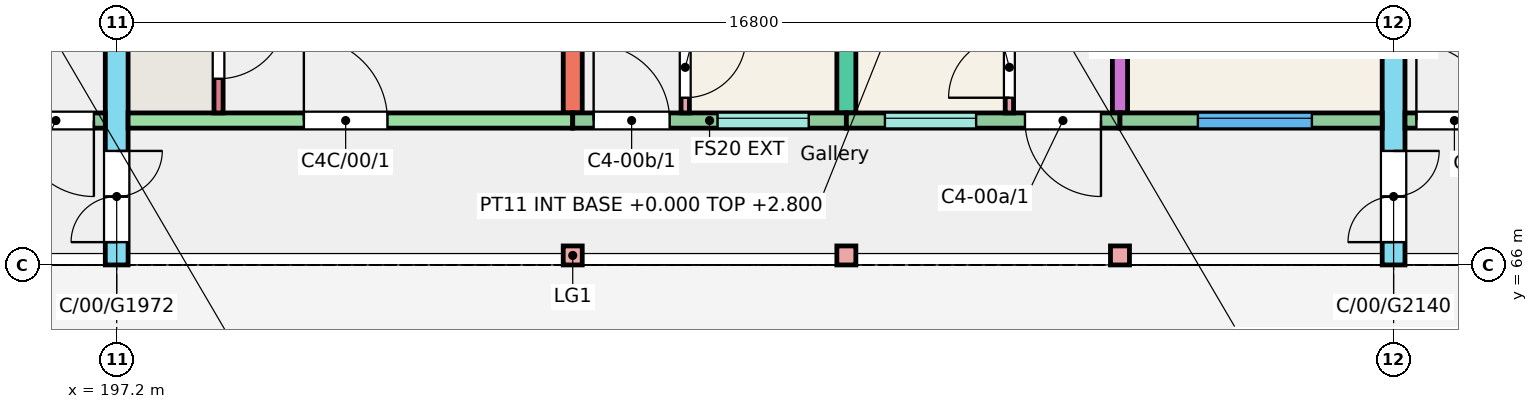
"""IFC4 building model, lengths in metres.
Left out: names, types, materials, properties, quantities, classifications, styles, units other than length and angle.
Written with IfcOpenShell. Run it as: python <this file> out.ifc"""

import sys

from ifc_helpers import new_model, si_unit, direction, frame, frame_2d, origin, origin_2d, place, context, subcontext, project, spatial, rectangle, extrude, element, fill, save


model = new_model("IFC4")
c1 = context("Model", 3, precision=1e-05, world=origin(), true_north=direction((0.0, 1.0)))
c2 = subcontext(c1, "Body", "Model", "MODEL_VIEW")
j1 = project(units=[si_unit("LENGTHUNIT", "METRE"), si_unit("PLANEANGLEUNIT", "RADIAN")], contexts=[c1])
p1 = place(None, origin())
s1 = spatial("IfcSite", under=j1, at=p1, CompositionType="ELEMENT")
p2 = place(p1, origin())
s2 = spatial("IfcBuilding", under=s1, at=p2, CompositionType="ELEMENT")
p3 = place(p2, origin())
s3 = spatial("IfcBuildingStorey", under=s2, at=p3, CompositionType="ELEMENT", Elevation=0.0)
p4 = place(p3, frame((197.2, 66.0, -0.25), z_axis=(0.0, 0.0, 1.0), x_axis=(0.0, 1.0, 0.0)))
e1 = element("IfcWall", 1, at=p4, inside=s3, PredefinedType="SHEAR", context=c2, shape_type="SweptSolid", body=[
    extrude(rectangle(XDim=11.0, YDim=0.3, at=frame_2d((5.5, 0.0))), origin(), (0.0, 0.0, 1.0), 3.25),
])
p5 = place(p4, frame((0.3, 0.0, 0.25)))
e2 = element("IfcOpeningElement", 2, at=p5, cuts=e1, PredefinedType="OPENING", context=c2, shape_type="SweptSolid", body=[
    extrude(rectangle(XDim=1.2, YDim=2.1, at=frame_2d((0.6, 1.05))), frame((0.0, 0.16, 0.0), z_axis=(0.0, -1.0, 0.0), x_axis=(1.0, 0.0, 0.0)), (0.0, 0.0, 1.0), 0.32),
])
for number, where, z_axis, x_axis in (
    (3, (203.2, 68.0, -0.25), (0.0, 0.0, 1.0), (0.0, 1.0, 0.0)),
    (4, (206.8, 68.0, -0.25), (0.0, 0.0, 1.0), (0.0, 1.0, 0.0)),
):
    element("IfcWall", number, at=place(p3, frame(where, z_axis=z_axis, x_axis=x_axis)), inside=s3, PredefinedType="SHEAR", context=c2, shape_type="SweptSolid", body=[
        extrude(rectangle(XDim=9.0, YDim=0.25, at=frame_2d((4.5, 0.0))), origin(), (0.0, 0.0, 1.0), 3.25),
    ])
p6 = place(p3, frame((210.4, 68.0, -0.25), z_axis=(0.0, 0.0, 1.0), x_axis=(0.0, 1.0, 0.0)))
e5 = element("IfcWall", 5, at=p6, inside=s3, PredefinedType="SHEAR", context=c2, shape_type="SweptSolid", body=[
    extrude(rectangle(XDim=9.0, YDim=0.2, at=frame_2d((4.5, 0.0))), origin(), (0.0, 0.0, 1.0), 3.25),
])
p7 = place(p6, frame((2.4, 0.0, 0.25)))
e6 = element("IfcOpeningElement", 6, at=p7, cuts=e5, PredefinedType="OPENING", context=c2, shape_type="SweptSolid", body=[
    extrude(rectangle(XDim=1.2, YDim=2.1, at=frame_2d((0.6, 1.05))), frame((0.0, 0.11, 0.0), z_axis=(0.0, -1.0, 0.0), x_axis=(1.0, 0.0, 0.0)), (0.0, 0.0, 1.0), 0.22),
])
p8 = place(p6, frame((6.4, 0.0, 0.25)))
e7 = element("IfcOpeningElement", 7, at=p8, cuts=e5, PredefinedType="OPENING", context=c2, shape_type="SweptSolid", body=[
    extrude(rectangle(XDim=1.2, YDim=2.1, at=frame_2d((0.6, 1.05))), frame((0.0, 0.11, 0.0), z_axis=(0.0, -1.0, 0.0), x_axis=(1.0, 0.0, 0.0)), (0.0, 0.0, 1.0), 0.22),
])
p9 = place(p3, frame((214.0, 66.0, -0.25), z_axis=(0.0, 0.0, 1.0), x_axis=(0.0, 1.0, 0.0)))
e8 = element("IfcWall", 8, at=p9, inside=s3, PredefinedType="SHEAR", context=c2, shape_type="SweptSolid", body=[
    extrude(rectangle(XDim=11.0, YDim=0.3, at=frame_2d((5.5, 0.0))), origin(), (0.0, 0.0, 1.0), 3.25),
])
p10 = place(p9, frame((0.3, 0.0, 0.25)))
e9 = element("IfcOpeningElement", 9, at=p10, cuts=e8, PredefinedType="OPENING", context=c2, shape_type="SweptSolid", body=[
    extrude(rectangle(XDim=1.2, YDim=2.1, at=frame_2d((0.6, 1.05))), frame((0.0, 0.16, 0.0), z_axis=(0.0, -1.0, 0.0), x_axis=(1.0, 0.0, 0.0)), (0.0, 0.0, 1.0), 0.32),
])
p11 = place(p3, frame((193.6, 67.9, -0.25), z_axis=(0.0, 0.0, 1.0), x_axis=(1.0, 0.0, 0.0)))
e10 = element("IfcWall", 10, at=p11, inside=s3, PredefinedType="SOLIDWALL", context=c2, shape_type="SweptSolid", body=[
    extrude(rectangle(XDim=3.45, YDim=0.2, at=frame_2d((1.725, 0.0))), origin(), (0.0, 0.0, 1.0), 3.25),
])
p12 = place(p11, frame((0.482, 0.0, 1.35)))
e11 = element("IfcOpeningElement", 11, at=p12, cuts=e10, PredefinedType="OPENING", context=c2, shape_type="SweptSolid", body=[
    extrude(rectangle(XDim=1.2, YDim=1.3, at=frame_2d((0.6, 0.65))), frame((0.0, 0.11, 0.0), z_axis=(0.0, -1.0, 0.0), x_axis=(1.0, 0.0, 0.0)), (0.0, 0.0, 1.0), 0.22),
])
p13 = place(p11, frame((2.3, 0.0, 0.25)))
e12 = element("IfcOpeningElement", 12, at=p13, cuts=e10, PredefinedType="OPENING", context=c2, shape_type="SweptSolid", body=[
    extrude(rectangle(XDim=1.0, YDim=2.1, at=frame_2d((0.5, 1.05))), frame((0.0, 0.11, 0.0), z_axis=(0.0, -1.0, 0.0), x_axis=(1.0, 0.0, 0.0)), (0.0, 0.0, 1.0), 0.22),
])
p14 = place(p3, frame((197.35, 67.9, -0.25), z_axis=(0.0, 0.0, 1.0), x_axis=(1.0, 0.0, 0.0)))
e13 = element("IfcWall", 13, at=p14, inside=s3, PredefinedType="SHEAR", context=c2, shape_type="SweptSolid", body=[
    extrude(rectangle(XDim=5.85, YDim=0.2, at=frame_2d((2.925, 0.0))), origin(), (0.0, 0.0, 1.0), 3.25),
])
p15 = place(p14, frame((2.312, 0.0, 0.25)))
e14 = element("IfcOpeningElement", 14, at=p15, cuts=e13, PredefinedType="OPENING", context=c2, shape_type="SweptSolid", body=[
    extrude(rectangle(XDim=1.1, YDim=2.1, at=frame_2d((0.55, 1.05))), frame((0.0, 0.11, 0.0), z_axis=(0.0, -1.0, 0.0), x_axis=(1.0, 0.0, 0.0)), (0.0, 0.0, 1.0), 0.22),
])
p16 = place(p3, frame((198.54, 68.0, -0.25), z_axis=(0.0, 0.0, 1.0), x_axis=(0.0, 1.0, 0.0)))
e15 = element("IfcWall", 15, at=p16, inside=s3, PredefinedType="SHEAR", context=c2, shape_type="SweptSolid", body=[
    extrude(rectangle(XDim=1.72, YDim=0.12, at=frame_2d((0.86, 0.0))), origin(), (0.0, 0.0, 1.0), 3.25),
])
p17 = place(p16, frame((0.45, 0.0, 0.25)))
e16 = element("IfcOpeningElement", 16, at=p17, cuts=e15, PredefinedType="OPENING", context=c2, shape_type="SweptSolid", body=[
    extrude(rectangle(XDim=0.9, YDim=2.1, at=frame_2d((0.45, 1.05))), frame((0.0, 0.07, 0.0), z_axis=(0.0, -1.0, 0.0), x_axis=(1.0, 0.0, 0.0)), (0.0, 0.0, 1.0), 0.14),
])
p18 = place(p3, frame((203.2, 67.9, -0.25), z_axis=(0.0, 0.0, 1.0), x_axis=(1.0, 0.0, 0.0)))
e17 = element("IfcWall", 17, at=p18, inside=s3, PredefinedType="SOLIDWALL", context=c2, shape_type="SweptSolid", body=[
    extrude(rectangle(XDim=3.6, YDim=0.2, at=frame_2d((1.8, 0.0))), origin(), (0.0, 0.0, 1.0), 3.25),
])
p19 = place(p18, frame((1.905, 0.0, 1.35)))
e18 = element("IfcOpeningElement", 18, at=p19, cuts=e17, PredefinedType="OPENING", context=c2, shape_type="SweptSolid", body=[
    extrude(rectangle(XDim=1.2, YDim=1.3, at=frame_2d((0.6, 0.65))), frame((0.0, 0.11, 0.0), z_axis=(0.0, -1.0, 0.0), x_axis=(1.0, 0.0, 0.0)), (0.0, 0.0, 1.0), 0.22),
])
p20 = place(p18, frame((0.275, 0.0, 0.25)))
e19 = element("IfcOpeningElement", 19, at=p20, cuts=e17, PredefinedType="OPENING", context=c2, shape_type="SweptSolid", body=[
    extrude(rectangle(XDim=1.0, YDim=2.1, at=frame_2d((0.5, 1.05))), frame((0.0, 0.11, 0.0), z_axis=(0.0, -1.0, 0.0), x_axis=(1.0, 0.0, 0.0)), (0.0, 0.0, 1.0), 0.22),
])
p21 = place(p3, frame((206.8, 67.9, -0.25), z_axis=(0.0, 0.0, 1.0), x_axis=(1.0, 0.0, 0.0)))
e20 = element("IfcWall", 20, at=p21, inside=s3, PredefinedType="SOLIDWALL", context=c2, shape_type="SweptSolid", body=[
    extrude(rectangle(XDim=3.6, YDim=0.2, at=frame_2d((1.8, 0.0))), origin(), (0.0, 0.0, 1.0), 3.25),
])
p22 = place(p21, frame((0.508, 0.0, 1.35)))
e21 = element("IfcOpeningElement", 21, at=p22, cuts=e20, PredefinedType="OPENING", context=c2, shape_type="SweptSolid", body=[
    extrude(rectangle(XDim=1.2, YDim=1.3, at=frame_2d((0.6, 0.65))), frame((0.0, 0.11, 0.0), z_axis=(0.0, -1.0, 0.0), x_axis=(1.0, 0.0, 0.0)), (0.0, 0.0, 1.0), 0.22),
])
p23 = place(p21, frame((2.35, 0.0, 0.25)))
e22 = element("IfcOpeningElement", 22, at=p23, cuts=e20, PredefinedType="OPENING", context=c2, shape_type="SweptSolid", body=[
    extrude(rectangle(XDim=1.0, YDim=2.1, at=frame_2d((0.5, 1.05))), frame((0.0, 0.11, 0.0), z_axis=(0.0, -1.0, 0.0), x_axis=(1.0, 0.0, 0.0)), (0.0, 0.0, 1.0), 0.22),
])
p24 = place(p3, frame((210.4, 67.9, -0.25), z_axis=(0.0, 0.0, 1.0), x_axis=(1.0, 0.0, 0.0)))
e23 = element("IfcWall", 23, at=p24, inside=s3, PredefinedType="SOLIDWALL", context=c2, shape_type="SweptSolid", body=[
    extrude(rectangle(XDim=3.45, YDim=0.2, at=frame_2d((1.725, 0.0))), origin(), (0.0, 0.0, 1.0), 3.25),
])
p25 = place(p24, frame((1.025, 0.0, 1.15)))
e24 = element("IfcOpeningElement", 24, at=p25, cuts=e23, PredefinedType="OPENING", context=c2, shape_type="SweptSolid", body=[
    extrude(rectangle(XDim=1.5, YDim=1.5, at=frame_2d((0.75, 0.75))), frame((0.0, 0.11, 0.0), z_axis=(0.0, -1.0, 0.0), x_axis=(1.0, 0.0, 0.0)), (0.0, 0.0, 1.0), 0.22),
])
p26 = place(p3, frame((214.15, 67.9, -0.25), z_axis=(0.0, 0.0, 1.0), x_axis=(1.0, 0.0, 0.0)))
e25 = element("IfcWall", 25, at=p26, inside=s3, PredefinedType="SOLIDWALL", context=c2, shape_type="SweptSolid", body=[
    extrude(rectangle(XDim=3.45, YDim=0.2, at=frame_2d((1.725, 0.0))), origin(), (0.0, 0.0, 1.0), 3.25),
])
p27 = place(p26, frame((1.768, 0.0, 1.35)))
e26 = element("IfcOpeningElement", 26, at=p27, cuts=e25, PredefinedType="OPENING", context=c2, shape_type="SweptSolid", body=[
    extrude(rectangle(XDim=1.2, YDim=1.3, at=frame_2d((0.6, 0.65))), frame((0.0, 0.11, 0.0), z_axis=(0.0, -1.0, 0.0), x_axis=(1.0, 0.0, 0.0)), (0.0, 0.0, 1.0), 0.22),
])
p28 = place(p26, frame((0.15, 0.0, 0.25)))
e27 = element("IfcOpeningElement", 27, at=p28, cuts=e25, PredefinedType="OPENING", context=c2, shape_type="SweptSolid", body=[
    extrude(rectangle(XDim=1.0, YDim=2.1, at=frame_2d((0.5, 1.05))), frame((0.0, 0.11, 0.0), z_axis=(0.0, -1.0, 0.0), x_axis=(1.0, 0.0, 0.0)), (0.0, 0.0, 1.0), 0.22),
])
for number, where, z_axis, x_axis in (
    (28, (203.2, 66.125, -0.25), (0.0, 0.0, 1.0), (1.0, 0.0, 0.0)),
    (29, (206.8, 66.125, -0.25), (0.0, 0.0, 1.0), (1.0, 0.0, 0.0)),
    (30, (210.4, 66.125, -0.25), (0.0, 0.0, 1.0), (1.0, 0.0, 0.0)),
):
    element("IfcColumn", number, at=place(p3, frame(where, z_axis=z_axis, x_axis=x_axis)), inside=s3, PredefinedType="COLUMN", context=c2, shape_type="SweptSolid", body=[
        extrude(rectangle(XDim=0.25, YDim=0.25, at=origin_2d()), origin(), (0.0, 0.0, 1.0), 3.25),
    ])
p29 = place(p3, frame((208.945, 68.0, 0.0), z_axis=(0.0, 0.0, 1.0), x_axis=(0.0, 1.0, 0.0)))
e31 = element("IfcWall", 31, at=p29, inside=s3, PredefinedType="PARTITIONING", context=c2, shape_type="SweptSolid", body=[
    extrude(rectangle(XDim=4.5, YDim=0.11, at=frame_2d((2.25, 0.0))), origin(), (0.0, 0.0, 1.0), 2.8),
])
p30 = place(p29, frame((0.2, 0.0, 0.0)))
e32 = element("IfcOpeningElement", 32, at=p30, cuts=e31, PredefinedType="OPENING", context=c2, shape_type="SweptSolid", body=[
    extrude(rectangle(XDim=0.8, YDim=2.1, at=frame_2d((0.4, 1.05))), frame((0.0, 0.065, 0.0), z_axis=(0.0, -1.0, 0.0), x_axis=(1.0, 0.0, 0.0)), (0.0, 0.0, 1.0), 0.13),
])
p31 = place(p29, frame((3.55, 0.0, 0.0)))
e33 = element("IfcOpeningElement", 33, at=p31, cuts=e31, PredefinedType="OPENING", context=c2, shape_type="SweptSolid", body=[
    extrude(rectangle(XDim=0.8, YDim=2.1, at=frame_2d((0.4, 1.05))), frame((0.0, 0.065, 0.0), z_axis=(0.0, -1.0, 0.0), x_axis=(1.0, 0.0, 0.0)), (0.0, 0.0, 1.0), 0.13),
])
p32 = place(p3, frame((204.68, 68.0, 0.0), z_axis=(0.0, 0.0, 1.0), x_axis=(0.0, 1.0, 0.0)))
e34 = element("IfcWall", 34, at=p32, inside=s3, PredefinedType="PARTITIONING", context=c2, shape_type="SweptSolid", body=[
    extrude(rectangle(XDim=4.7, YDim=0.11, at=frame_2d((2.35, 0.0))), origin(), (0.0, 0.0, 1.0), 2.8),
])
p33 = place(p32, frame((0.2, 0.0, 0.0)))
e35 = element("IfcOpeningElement", 35, at=p33, cuts=e34, PredefinedType="OPENING", context=c2, shape_type="SweptSolid", body=[
    extrude(rectangle(XDim=0.8, YDim=2.1, at=frame_2d((0.4, 1.05))), frame((0.0, 0.065, 0.0), z_axis=(0.0, -1.0, 0.0), x_axis=(1.0, 0.0, 0.0)), (0.0, 0.0, 1.0), 0.13),
])
p34 = place(p32, frame((3.75, 0.0, 0.0)))
e36 = element("IfcOpeningElement", 36, at=p34, cuts=e34, PredefinedType="OPENING", context=c2, shape_type="SweptSolid", body=[
    extrude(rectangle(XDim=0.8, YDim=2.1, at=frame_2d((0.4, 1.05))), frame((0.0, 0.065, 0.0), z_axis=(0.0, -1.0, 0.0), x_axis=(1.0, 0.0, 0.0)), (0.0, 0.0, 1.0), 0.13),
])
p35 = place(p25, origin())
e37 = element("IfcWindow", 37, at=p35, inside=s3, PartitioningType="SINGLE_PANEL", PredefinedType="WINDOW", context=c2, shape_type="SweptSolid", body=[
    extrude(rectangle(XDim=1.5, YDim=1.5, at=frame_2d((0.75, 0.75))), frame((0.0, 0.06, 0.0), z_axis=(0.0, -1.0, 0.0), x_axis=(1.0, 0.0, 0.0)), (0.0, 0.0, 1.0), 0.06),
])
fill(e24, e37)
p36 = place(p22, origin())
e38 = element("IfcWindow", 38, at=p36, inside=s3, PartitioningType="SINGLE_PANEL", PredefinedType="WINDOW", context=c2, shape_type="SweptSolid", body=[
    extrude(rectangle(XDim=1.2, YDim=1.3, at=frame_2d((0.6, 0.65))), frame((0.0, 0.06, 0.0), z_axis=(0.0, -1.0, 0.0), x_axis=(1.0, 0.0, 0.0)), (0.0, 0.0, 1.0), 0.06),
])
fill(e21, e38)
p37 = place(p19, origin())
e39 = element("IfcWindow", 39, at=p37, inside=s3, PartitioningType="SINGLE_PANEL", PredefinedType="WINDOW", context=c2, shape_type="SweptSolid", body=[
    extrude(rectangle(XDim=1.2, YDim=1.3, at=frame_2d((0.6, 0.65))), frame((0.0, 0.06, 0.0), z_axis=(0.0, -1.0, 0.0), x_axis=(1.0, 0.0, 0.0)), (0.0, 0.0, 1.0), 0.06),
])
fill(e18, e39)
p38 = place(p13, origin())
e40 = element("IfcDoor", 40, at=p38, inside=s3, OperationType="SINGLE_SWING_RIGHT", PredefinedType="DOOR", context=c2, shape_type="SweptSolid", body=[
    extrude(rectangle(XDim=1.0, YDim=2.1, at=frame_2d((0.5, 1.05))), frame((0.0, 0.025, 0.0), z_axis=(0.0, -1.0, 0.0), x_axis=(1.0, 0.0, 0.0)), (0.0, 0.0, 1.0), 0.05),
])
fill(e12, e40)
p39 = place(p23, origin())
e41 = element("IfcDoor", 41, at=p39, inside=s3, OperationType="SINGLE_SWING_RIGHT", PredefinedType="DOOR", context=c2, shape_type="SweptSolid", body=[
    extrude(rectangle(XDim=1.0, YDim=2.1, at=frame_2d((0.5, 1.05))), frame((0.0, 0.025, 0.0), z_axis=(0.0, -1.0, 0.0), x_axis=(1.0, 0.0, 0.0)), (0.0, 0.0, 1.0), 0.05),
])
fill(e22, e41)
p40 = place(p30, origin())
e42 = element("IfcDoor", 42, at=p40, inside=s3, OperationType="SINGLE_SWING_LEFT", PredefinedType="DOOR", context=c2, shape_type="SweptSolid", body=[
    extrude(rectangle(XDim=0.8, YDim=2.1, at=frame_2d((0.4, 1.05))), frame((0.0, 0.025, 0.0), z_axis=(0.0, -1.0, 0.0), x_axis=(1.0, 0.0, 0.0)), (0.0, 0.0, 1.0), 0.05),
])
fill(e32, e42)
p41 = place(p20, origin())
e43 = element("IfcDoor", 43, at=p41, inside=s3, OperationType="SINGLE_SWING_LEFT", PredefinedType="DOOR", context=c2, shape_type="SweptSolid", body=[
    extrude(rectangle(XDim=1.0, YDim=2.1, at=frame_2d((0.5, 1.05))), frame((0.0, 0.025, 0.0), z_axis=(0.0, -1.0, 0.0), x_axis=(1.0, 0.0, 0.0)), (0.0, 0.0, 1.0), 0.05),
])
fill(e19, e43)
p42 = place(p33, origin())
e44 = element("IfcDoor", 44, at=p42, inside=s3, OperationType="SINGLE_SWING_RIGHT", PredefinedType="DOOR", context=c2, shape_type="SweptSolid", body=[
    extrude(rectangle(XDim=0.8, YDim=2.1, at=frame_2d((0.4, 1.05))), frame((0.0, 0.025, 0.0), z_axis=(0.0, -1.0, 0.0), x_axis=(1.0, 0.0, 0.0)), (0.0, 0.0, 1.0), 0.05),
])
fill(e35, e44)
p43 = place(p28, origin())
e45 = element("IfcDoor", 45, at=p43, inside=s3, OperationType="SINGLE_SWING_LEFT", PredefinedType="DOOR", context=c2, shape_type="SweptSolid", body=[
    extrude(rectangle(XDim=1.0, YDim=2.1, at=frame_2d((0.5, 1.05))), frame((0.0, 0.025, 0.0), z_axis=(0.0, -1.0, 0.0), x_axis=(1.0, 0.0, 0.0)), (0.0, 0.0, 1.0), 0.05),
])
fill(e27, e45)
p44 = place(p15, origin())
e46 = element("IfcDoor", 46, at=p44, inside=s3, OperationType="SINGLE_SWING_LEFT", PredefinedType="DOOR", context=c2, shape_type="SweptSolid", body=[
    extrude(rectangle(XDim=1.1, YDim=2.1, at=frame_2d((0.55, 1.05))), frame((0.0, 0.025, 0.0), z_axis=(0.0, -1.0, 0.0), x_axis=(1.0, 0.0, 0.0)), (0.0, 0.0, 1.0), 0.05),
])
fill(e14, e46)
p45 = place(p17, origin())
e47 = element("IfcDoor", 47, at=p45, inside=s3, OperationType="SINGLE_SWING_RIGHT", PredefinedType="DOOR", context=c2, shape_type="SweptSolid", body=[
    extrude(rectangle(XDim=0.9, YDim=2.1, at=frame_2d((0.45, 1.05))), frame((0.0, 0.025, 0.0), z_axis=(0.0, -1.0, 0.0), x_axis=(1.0, 0.0, 0.0)), (0.0, 0.0, 1.0), 0.05),
])
fill(e16, e47)
p46 = place(p5, origin())
e48 = element("IfcDoor", 48, at=p46, inside=s3, OperationType="DOUBLE_DOOR_SINGLE_SWING", PredefinedType="DOOR", context=c2, shape_type="SweptSolid", body=[
    extrude(rectangle(XDim=1.2, YDim=2.1, at=frame_2d((0.6, 1.05))), frame((0.0, 0.025, 0.0), z_axis=(0.0, -1.0, 0.0), x_axis=(1.0, 0.0, 0.0)), (0.0, 0.0, 1.0), 0.05),
])
fill(e2, e48)
p47 = place(p10, origin())
e49 = element("IfcDoor", 49, at=p47, inside=s3, OperationType="DOUBLE_DOOR_SINGLE_SWING", PredefinedType="DOOR", context=c2, shape_type="SweptSolid", body=[
    extrude(rectangle(XDim=1.2, YDim=2.1, at=frame_2d((0.6, 1.05))), frame((0.0, 0.025, 0.0), z_axis=(0.0, -1.0, 0.0), x_axis=(1.0, 0.0, 0.0)), (0.0, 0.0, 1.0), 0.05),
])
fill(e9, e49)
save(model, sys.argv[1])
